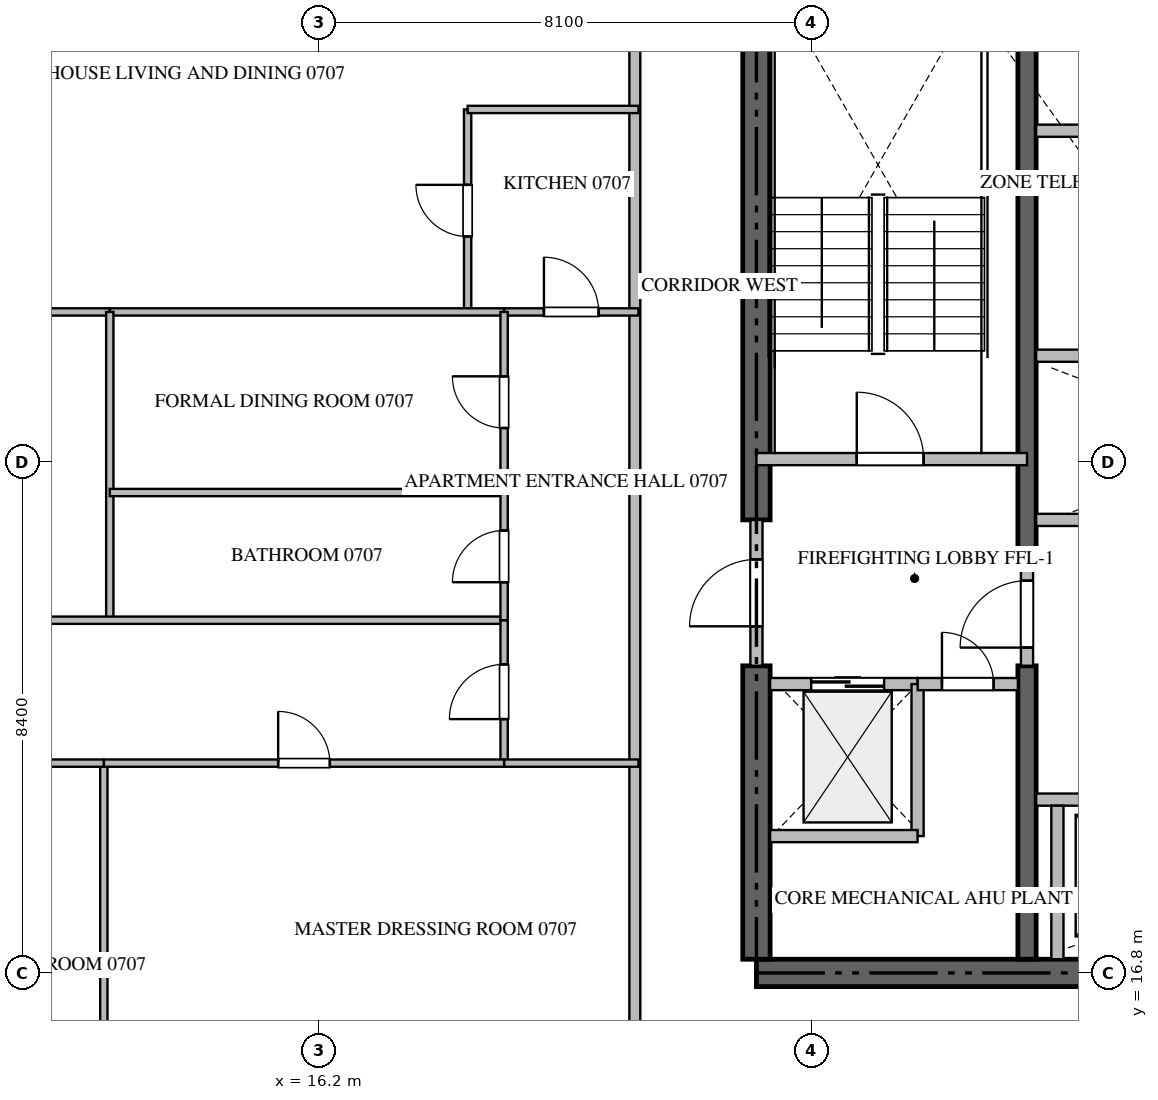
"""IFC4 building model, lengths in metres.
Left out: names, types, materials, properties, quantities, classifications, styles, units other than length and angle.
Written with IfcOpenShell. Run it as: python <this file> out.ifc"""

import sys

from ifc_helpers import new_model, si_unit, direction, frame, frame_2d, origin, place, context, subcontext, project, spatial, rectangle, extrude, source, transform, mapped, element, fill, save


model = new_model("IFC4")
c1 = context("Model", 3, precision=1e-05, world=origin(), true_north=direction((0.0, 1.0)))
c2 = subcontext(c1, "Body", "Model", "MODEL_VIEW")
j1 = project(units=[si_unit("LENGTHUNIT", "METRE"), si_unit("PLANEANGLEUNIT", "RADIAN")], contexts=[c1])
p1 = place(None, origin())
s1 = spatial("IfcSite", under=j1, at=p1, CompositionType="ELEMENT")
p2 = place(p1, origin())
s2 = spatial("IfcBuilding", under=s1, at=p2, CompositionType="ELEMENT")
p3 = place(p2, frame((0.0, 0.0, 34.2)))
s3 = spatial("IfcBuildingStorey", under=s2, at=p3, CompositionType="ELEMENT", Elevation=34.2)
p4 = place(p3, frame((23.4, 16.8, -0.26), z_axis=(0.0, 0.0, 1.0), x_axis=(1.0, 0.0, 0.0)))
e1 = element("IfcWall", 1, at=p4, inside=s3, PredefinedType="SHEAR", context=c2, shape_type="SweptSolid", body=[
    extrude(rectangle(XDim=18.0, YDim=0.45, at=frame_2d((9.0, 0.0))), origin(), (0.0, 0.0, 1.0), 3.748),
])
p5 = place(p3, frame((23.4, 17.025, -0.26), z_axis=(0.0, 0.0, 1.0), x_axis=(0.0, 1.0, 0.0)))
e2 = element("IfcWall", 2, at=p5, inside=s3, PredefinedType="SHEAR", context=c2, shape_type="SweptSolid", body=[
    extrude(rectangle(XDim=4.825, YDim=0.45, at=frame_2d((2.413, 0.0))), origin(), (0.0, 0.0, 1.0), 3.748),
])
p6 = place(p3, frame((23.4, 24.25, -0.26), z_axis=(0.0, 0.0, 1.0), x_axis=(0.0, 1.0, 0.0)))
e3 = element("IfcWall", 3, at=p6, inside=s3, PredefinedType="SHEAR", context=c2, shape_type="SweptSolid", body=[
    extrude(rectangle(XDim=9.125, YDim=0.45, at=frame_2d((4.562, 0.0))), origin(), (0.0, 0.0, 1.0), 3.748),
])
p7 = place(p3, frame((27.85, 17.025, -0.26), z_axis=(0.0, 0.0, 1.0), x_axis=(0.0, 1.0, 0.0)))
e4 = element("IfcWall", 4, at=p7, inside=s3, PredefinedType="SHEAR", context=c2, shape_type="SweptSolid", body=[
    extrude(rectangle(XDim=4.825, YDim=0.3, at=frame_2d((2.413, 0.0))), origin(), (0.0, 0.0, 1.0), 3.748),
])
p8 = place(p3, frame((27.85, 23.55, -0.26), z_axis=(0.0, 0.0, 1.0), x_axis=(0.0, 1.0, 0.0)))
e5 = element("IfcWall", 5, at=p8, inside=s3, PredefinedType="SHEAR", context=c2, shape_type="SweptSolid", body=[
    extrude(rectangle(XDim=9.825, YDim=0.3, at=frame_2d((4.913, 0.0))), origin(), (0.0, 0.0, 1.0), 3.748),
])
p9 = place(p3, frame((23.4, 25.25, 0.0), z_axis=(0.0, 0.0, 1.0), x_axis=(1.0, 0.0, 0.0)))
e6 = element("IfcWall", 6, at=p9, inside=s3, PredefinedType="STANDARD", context=c2, shape_type="SweptSolid", body=[
    extrude(rectangle(XDim=4.45, YDim=0.2, at=frame_2d((2.225, 0.0))), origin(), (0.0, 0.0, 1.0), 3.49),
])
p10 = place(p9, frame((1.65, 0.0, 0.0)))
e7 = element("IfcOpeningElement", 7, at=p10, cuts=e6, PredefinedType="OPENING", context=c2, shape_type="SweptSolid", body=[
    extrude(rectangle(XDim=1.1, YDim=2.15, at=frame_2d((0.55, 1.075))), frame((0.0, 0.11, 0.0), z_axis=(0.0, -1.0, 0.0), x_axis=(1.0, 0.0, 0.0)), (0.0, 0.0, 1.0), 0.22),
])
p11 = place(p3, frame((23.625, 21.55, 0.0), z_axis=(0.0, 0.0, 1.0), x_axis=(1.0, 0.0, 0.0)))
e8 = element("IfcWall", 8, at=p11, inside=s3, PredefinedType="STANDARD", context=c2, shape_type="SweptSolid", body=[
    extrude(rectangle(XDim=2.425, YDim=0.2, at=frame_2d((1.212, 0.0))), origin(), (0.0, 0.0, 1.0), 3.49),
])
p12 = place(p11, frame((0.675, 0.0, 0.0)))
e9 = element("IfcOpeningElement", 9, at=p12, cuts=e8, PredefinedType="OPENING", context=c2, shape_type="SweptSolid", body=[
    extrude(rectangle(XDim=1.2, YDim=2.2, at=frame_2d((0.6, 1.1))), frame((0.0, 0.11, 0.0), z_axis=(0.0, -1.0, 0.0), x_axis=(1.0, 0.0, 0.0)), (0.0, 0.0, 1.0), 0.22),
])
p13 = place(p3, frame((28.0, 19.65, 0.0), z_axis=(0.0, 0.0, 1.0), x_axis=(1.0, 0.0, 0.0)))
e10 = element("IfcWall", 10, at=p13, inside=s3, PredefinedType="STANDARD", context=c2, shape_type="SweptSolid", body=[
    extrude(rectangle(XDim=2.65, YDim=0.2, at=frame_2d((1.325, 0.0))), origin(), (0.0, 0.0, 1.0), 3.49),
])
p14 = place(p13, frame((0.9, 0.0, 0.0)))
e11 = element("IfcOpeningElement", 11, at=p14, cuts=e10, PredefinedType="OPENING", context=c2, shape_type="SweptSolid", body=[
    extrude(rectangle(XDim=1.1, YDim=2.2, at=frame_2d((0.55, 1.1))), frame((0.0, 0.11, 0.0), z_axis=(0.0, -1.0, 0.0), x_axis=(1.0, 0.0, 0.0)), (0.0, 0.0, 1.0), 0.22),
])
p15 = place(p3, frame((28.35, 17.025, 0.0), z_axis=(0.0, 0.0, 1.0), x_axis=(0.0, 1.0, 0.0)))
e12 = element("IfcWall", 12, at=p15, inside=s3, PredefinedType="STANDARD", context=c2, shape_type="SweptSolid", body=[
    extrude(rectangle(XDim=2.525, YDim=0.2, at=frame_2d((1.263, 0.0))), origin(), (0.0, 0.0, 1.0), 3.49),
])
p16 = place(p3, frame((28.0, 24.25, 0.0), z_axis=(0.0, 0.0, 1.0), x_axis=(1.0, 0.0, 0.0)))
e13 = element("IfcWall", 13, at=p16, inside=s3, PredefinedType="STANDARD", context=c2, shape_type="SweptSolid", body=[
    extrude(rectangle(XDim=2.425, YDim=0.2, at=frame_2d((1.212, 0.0))), origin(), (0.0, 0.0, 1.0), 3.49),
])
p17 = place(p3, frame((28.0, 30.65, 0.0), z_axis=(0.0, 0.0, 1.0), x_axis=(1.0, 0.0, 0.0)))
e14 = element("IfcWall", 14, at=p17, inside=s3, PredefinedType="STANDARD", context=c2, shape_type="SweptSolid", body=[
    extrude(rectangle(XDim=2.55, YDim=0.2, at=frame_2d((1.275, 0.0))), origin(), (0.0, 0.0, 1.0), 3.49),
])
p18 = place(p3, frame((26.05, 19.05, 0.0), z_axis=(0.0, 0.0, 1.0), x_axis=(0.0, 1.0, 0.0)))
e15 = element("IfcWall", 15, at=p18, inside=s3, PredefinedType="STANDARD", context=c2, shape_type="SweptSolid", body=[
    extrude(rectangle(XDim=2.5, YDim=0.2, at=frame_2d((1.25, 0.0))), origin(), (0.0, 0.0, 1.0), 3.49),
])
p19 = place(p3, frame((23.625, 19.05, 0.0), z_axis=(0.0, 0.0, 1.0), x_axis=(1.0, 0.0, 0.0)))
e16 = element("IfcWall", 16, at=p19, inside=s3, PredefinedType="STANDARD", context=c2, shape_type="SweptSolid", body=[
    extrude(rectangle(XDim=2.425, YDim=0.2, at=frame_2d((1.212, 0.0))), origin(), (0.0, 0.0, 1.0), 3.49),
])
p20 = place(p3, frame((26.052, 21.55, 0.0), z_axis=(0.0, 0.0, 1.0), x_axis=(1.0, 0.0, 0.0)))
e17 = element("IfcWall", 17, at=p20, inside=s3, PredefinedType="STANDARD", context=c2, shape_type="SweptSolid", body=[
    extrude(rectangle(XDim=1.648, YDim=0.2, at=frame_2d((0.824, 0.0))), origin(), (0.0, 0.0, 1.0), 3.49),
])
p21 = place(p20, frame((0.399, 0.0, 0.0)))
e18 = element("IfcOpeningElement", 18, at=p21, cuts=e17, PredefinedType="OPENING", context=c2, shape_type="SweptSolid", body=[
    extrude(rectangle(XDim=0.85, YDim=2.1, at=frame_2d((0.425, 1.05))), frame((0.0, 0.11, 0.0), z_axis=(0.0, -1.0, 0.0), x_axis=(1.0, 0.0, 0.0)), (0.0, 0.0, 1.0), 0.22),
])
p22 = place(p3, frame((23.4, 21.852, 0.0), z_axis=(0.0, 0.0, 1.0), x_axis=(0.0, 1.0, 0.0)))
e19 = element("IfcWall", 19, at=p22, inside=s3, PredefinedType="STANDARD", context=c2, shape_type="SweptSolid", body=[
    extrude(rectangle(XDim=2.396, YDim=0.2, at=frame_2d((1.198, 0.0))), origin(), (0.0, 0.0, 1.0), 3.49),
])
p23 = place(p22, frame((0.648, 0.0, 0.0)))
e20 = element("IfcOpeningElement", 20, at=p23, cuts=e19, PredefinedType="OPENING", context=c2, shape_type="SweptSolid", body=[
    extrude(rectangle(XDim=1.1, YDim=2.15, at=frame_2d((0.55, 1.075))), frame((0.0, 0.11, 0.0), z_axis=(0.0, -1.0, 0.0), x_axis=(1.0, 0.0, 0.0)), (0.0, 0.0, 1.0), 0.22),
])
p24 = place(p3, frame((27.85, 21.852, 0.0), z_axis=(0.0, 0.0, 1.0), x_axis=(0.0, 1.0, 0.0)))
e21 = element("IfcWall", 21, at=p24, inside=s3, PredefinedType="STANDARD", context=c2, shape_type="SweptSolid", body=[
    extrude(rectangle(XDim=1.696, YDim=0.2, at=frame_2d((0.848, 0.0))), origin(), (0.0, 0.0, 1.0), 3.49),
])
p25 = place(p24, frame((0.298, 0.0, 0.0)))
e22 = element("IfcOpeningElement", 22, at=p25, cuts=e21, PredefinedType="OPENING", context=c2, shape_type="SweptSolid", body=[
    extrude(rectangle(XDim=1.1, YDim=2.15, at=frame_2d((0.55, 1.075))), frame((0.0, 0.11, 0.0), z_axis=(0.0, -1.0, 0.0), x_axis=(1.0, 0.0, 0.0)), (0.0, 0.0, 1.0), 0.22),
])
p26 = place(p3, frame((28.0, 26.95, 0.0), z_axis=(0.0, 0.0, 1.0), x_axis=(1.0, 0.0, 0.0)))
e23 = element("IfcWall", 23, at=p26, inside=s3, PredefinedType="STANDARD", context=c2, shape_type="SweptSolid", body=[
    extrude(rectangle(XDim=6.95, YDim=0.2, at=frame_2d((3.475, 0.0))), origin(), (0.0, 0.0, 1.0), 3.49),
])
p27 = place(p3, frame((21.4, 14.9, 0.0), z_axis=(0.0, 0.0, 1.0), x_axis=(0.0, 1.0, 0.0)))
e24 = element("IfcWall", 24, at=p27, inside=s3, PredefinedType="PARTITIONING", context=c2, shape_type="SweptSolid", body=[
    extrude(rectangle(XDim=20.6, YDim=0.18, at=frame_2d((10.3, 0.0))), origin(), (0.0, 0.0, 1.0), 3.49),
])
p28 = place(p27, frame((17.64, 0.0, 0.0)))
e25 = element("IfcOpeningElement", 25, at=p28, cuts=e24, PredefinedType="OPENING", context=c2, shape_type="SweptSolid", body=[
    extrude(rectangle(XDim=1.0, YDim=2.15, at=frame_2d((0.5, 1.075))), frame((0.0, 0.1, 0.0), z_axis=(0.0, -1.0, 0.0), x_axis=(1.0, 0.0, 0.0)), (0.0, 0.0, 1.0), 0.2),
])
p29 = place(p3, frame((18.65, 27.67, 0.0), z_axis=(0.0, 0.0, 1.0), x_axis=(0.0, 1.0, 0.0)))
e26 = element("IfcWall", 26, at=p29, inside=s3, PredefinedType="PARTITIONING", context=c2, shape_type="SweptSolid", body=[
    extrude(rectangle(XDim=3.33, YDim=0.12, at=frame_2d((1.665, 0.0))), origin(), (0.0, 0.0, 1.0), 3.49),
])
p30 = place(p29, frame((1.24, 0.0, 0.0)))
e27 = element("IfcOpeningElement", 27, at=p30, cuts=e26, PredefinedType="OPENING", context=c2, shape_type="SweptSolid", body=[
    extrude(rectangle(XDim=0.85, YDim=2.1, at=frame_2d((0.425, 1.05))), frame((0.0, 0.07, 0.0), z_axis=(0.0, -1.0, 0.0), x_axis=(1.0, 0.0, 0.0)), (0.0, 0.0, 1.0), 0.14),
])
p31 = place(p3, frame((18.65, 31.0, 0.0), z_axis=(0.0, 0.0, 1.0), x_axis=(1.0, 0.0, 0.0)))
e28 = element("IfcWall", 28, at=p31, inside=s3, PredefinedType="PARTITIONING", context=c2, shape_type="SweptSolid", body=[
    extrude(rectangle(XDim=2.81, YDim=0.12, at=frame_2d((1.405, 0.0))), origin(), (0.0, 0.0, 1.0), 3.49),
])
p32 = place(p3, frame((19.25, 27.67, 0.0), z_axis=(0.0, 0.0, 1.0), x_axis=(1.0, 0.0, 0.0)))
e29 = element("IfcWall", 29, at=p32, inside=s3, PredefinedType="PARTITIONING", context=c2, shape_type="SweptSolid", body=[
    extrude(rectangle(XDim=2.21, YDim=0.12, at=frame_2d((1.105, 0.0))), origin(), (0.0, 0.0, 1.0), 3.49),
])
p33 = place(p32, frame((0.655, 0.0, 0.0)))
e30 = element("IfcOpeningElement", 30, at=p33, cuts=e29, PredefinedType="OPENING", context=c2, shape_type="SweptSolid", body=[
    extrude(rectangle(XDim=0.9, YDim=2.1, at=frame_2d((0.45, 1.05))), frame((0.0, 0.07, 0.0), z_axis=(0.0, -1.0, 0.0), x_axis=(1.0, 0.0, 0.0)), (0.0, 0.0, 1.0), 0.14),
])
p34 = place(p3, frame((6.095, 27.67, 0.0), z_axis=(0.0, 0.0, 1.0), x_axis=(1.0, 0.0, 0.0)))
e31 = element("IfcWall", 31, at=p34, inside=s3, PredefinedType="PARTITIONING", context=c2, shape_type="SweptSolid", body=[
    extrude(rectangle(XDim=6.67, YDim=0.12, at=frame_2d((3.335, 0.0))), origin(), (0.0, 0.0, 1.0), 3.49),
])
p35 = place(p34, frame((3.174, 0.0, 0.0)))
e32 = element("IfcOpeningElement", 32, at=p35, cuts=e31, PredefinedType="OPENING", context=c2, shape_type="SweptSolid", body=[
    extrude(rectangle(XDim=0.9, YDim=2.1, at=frame_2d((0.45, 1.05))), frame((0.0, 0.07, 0.0), z_axis=(0.0, -1.0, 0.0), x_axis=(1.0, 0.0, 0.0)), (0.0, 0.0, 1.0), 0.14),
])
p36 = place(p3, frame((12.767, 27.67, 0.0), z_axis=(0.0, 0.0, 1.0), x_axis=(1.0, 0.0, 0.0)))
e33 = element("IfcWall", 33, at=p36, inside=s3, PredefinedType="PARTITIONING", context=c2, shape_type="SweptSolid", body=[
    extrude(rectangle(XDim=6.481, YDim=0.12, at=frame_2d((3.24, 0.0))), origin(), (0.0, 0.0, 1.0), 3.49),
])
p37 = place(p3, frame((12.765, 22.6, 0.0), z_axis=(0.0, 0.0, 1.0), x_axis=(0.0, 1.0, 0.0)))
e34 = element("IfcWall", 34, at=p37, inside=s3, PredefinedType="PARTITIONING", context=c2, shape_type="SweptSolid", body=[
    extrude(rectangle(XDim=5.07, YDim=0.12, at=frame_2d((2.535, 0.0))), origin(), (0.0, 0.0, 1.0), 3.49),
])
p38 = place(p3, frame((6.095, 22.6, 0.0), z_axis=(0.0, 0.0, 1.0), x_axis=(1.0, 0.0, 0.0)))
e35 = element("IfcWall", 35, at=p38, inside=s3, PredefinedType="PARTITIONING", context=c2, shape_type="SweptSolid", body=[
    extrude(rectangle(XDim=13.155, YDim=0.12, at=frame_2d((6.578, 0.0))), origin(), (0.0, 0.0, 1.0), 3.49),
])
p39 = place(p3, frame((12.765, 24.7, 0.0), z_axis=(0.0, 0.0, 1.0), x_axis=(1.0, 0.0, 0.0)))
e36 = element("IfcWall", 36, at=p39, inside=s3, PredefinedType="PARTITIONING", context=c2, shape_type="SweptSolid", body=[
    extrude(rectangle(XDim=6.485, YDim=0.12, at=frame_2d((3.243, 0.0))), origin(), (0.0, 0.0, 1.0), 3.49),
])
p40 = place(p3, frame((19.25, 22.6, 0.0), z_axis=(0.0, 0.0, 1.0), x_axis=(0.0, 1.0, 0.0)))
e37 = element("IfcWall", 37, at=p40, inside=s3, PredefinedType="PARTITIONING", context=c2, shape_type="SweptSolid", body=[
    extrude(rectangle(XDim=2.1, YDim=0.12, at=frame_2d((1.05, 0.0))), origin(), (0.0, 0.0, 1.0), 3.49),
])
p41 = place(p40, frame((0.625, 0.0, 0.0)))
e38 = element("IfcOpeningElement", 38, at=p41, cuts=e37, PredefinedType="OPENING", context=c2, shape_type="SweptSolid", body=[
    extrude(rectangle(XDim=0.85, YDim=2.1, at=frame_2d((0.425, 1.05))), frame((0.0, 0.07, 0.0), z_axis=(0.0, -1.0, 0.0), x_axis=(1.0, 0.0, 0.0)), (0.0, 0.0, 1.0), 0.14),
])
p42 = place(p3, frame((19.25, 24.702, 0.0), z_axis=(0.0, 0.0, 1.0), x_axis=(0.0, 1.0, 0.0)))
e39 = element("IfcWall", 39, at=p42, inside=s3, PredefinedType="PARTITIONING", context=c2, shape_type="SweptSolid", body=[
    extrude(rectangle(XDim=2.968, YDim=0.12, at=frame_2d((1.484, 0.0))), origin(), (0.0, 0.0, 1.0), 3.49),
])
p43 = place(p42, frame((1.059, 0.0, 0.0)))
e40 = element("IfcOpeningElement", 40, at=p43, cuts=e39, PredefinedType="OPENING", context=c2, shape_type="SweptSolid", body=[
    extrude(rectangle(XDim=0.85, YDim=2.1, at=frame_2d((0.425, 1.05))), frame((0.0, 0.07, 0.0), z_axis=(0.0, -1.0, 0.0), x_axis=(1.0, 0.0, 0.0)), (0.0, 0.0, 1.0), 0.14),
])
p44 = place(p3, frame((19.25, 20.25, 0.0), z_axis=(0.0, 0.0, 1.0), x_axis=(0.0, 1.0, 0.0)))
e41 = element("IfcWall", 41, at=p44, inside=s3, PredefinedType="PARTITIONING", context=c2, shape_type="SweptSolid", body=[
    extrude(rectangle(XDim=2.348, YDim=0.12, at=frame_2d((1.174, 0.0))), origin(), (0.0, 0.0, 1.0), 3.49),
])
p45 = place(p44, frame((0.724, 0.0, 0.0)))
e42 = element("IfcOpeningElement", 42, at=p45, cuts=e41, PredefinedType="OPENING", context=c2, shape_type="SweptSolid", body=[
    extrude(rectangle(XDim=0.9, YDim=2.1, at=frame_2d((0.45, 1.05))), frame((0.0, 0.07, 0.0), z_axis=(0.0, -1.0, 0.0), x_axis=(1.0, 0.0, 0.0)), (0.0, 0.0, 1.0), 0.14),
])
p46 = place(p3, frame((12.667, 14.84, 0.0), z_axis=(0.0, 0.0, 1.0), x_axis=(0.0, 1.0, 0.0)))
e43 = element("IfcWall", 43, at=p46, inside=s3, PredefinedType="PARTITIONING", context=c2, shape_type="SweptSolid", body=[
    extrude(rectangle(XDim=5.41, YDim=0.12, at=frame_2d((2.705, 0.0))), origin(), (0.0, 0.0, 1.0), 3.49),
])
p47 = place(p3, frame((10.05, 20.25, 0.0), z_axis=(0.0, 0.0, 1.0), x_axis=(1.0, 0.0, 0.0)))
e44 = element("IfcWall", 44, at=p47, inside=s3, PredefinedType="PARTITIONING", context=c2, shape_type="SweptSolid", body=[
    extrude(rectangle(XDim=2.617, YDim=0.12, at=frame_2d((1.309, 0.0))), origin(), (0.0, 0.0, 1.0), 3.49),
])
p48 = place(p47, frame((0.883, 0.0, 0.0)))
e45 = element("IfcOpeningElement", 45, at=p48, cuts=e44, PredefinedType="OPENING", context=c2, shape_type="SweptSolid", body=[
    extrude(rectangle(XDim=0.85, YDim=2.1, at=frame_2d((0.425, 1.05))), frame((0.0, 0.07, 0.0), z_axis=(0.0, -1.0, 0.0), x_axis=(1.0, 0.0, 0.0)), (0.0, 0.0, 1.0), 0.14),
])
p49 = place(p3, frame((12.669, 20.25, 0.0), z_axis=(0.0, 0.0, 1.0), x_axis=(1.0, 0.0, 0.0)))
e46 = element("IfcWall", 46, at=p49, inside=s3, PredefinedType="PARTITIONING", context=c2, shape_type="SweptSolid", body=[
    extrude(rectangle(XDim=6.581, YDim=0.12, at=frame_2d((3.291, 0.0))), origin(), (0.0, 0.0, 1.0), 3.49),
])
p50 = place(p49, frame((2.865, 0.0, 0.0)))
e47 = element("IfcOpeningElement", 47, at=p50, cuts=e46, PredefinedType="OPENING", context=c2, shape_type="SweptSolid", body=[
    extrude(rectangle(XDim=0.85, YDim=2.1, at=frame_2d((0.425, 1.05))), frame((0.0, 0.07, 0.0), z_axis=(0.0, -1.0, 0.0), x_axis=(1.0, 0.0, 0.0)), (0.0, 0.0, 1.0), 0.14),
])
p51 = place(p3, frame((19.252, 20.25, 0.0), z_axis=(0.0, 0.0, 1.0), x_axis=(1.0, 0.0, 0.0)))
e48 = element("IfcWall", 48, at=p51, inside=s3, PredefinedType="PARTITIONING", context=c2, shape_type="SweptSolid", body=[
    extrude(rectangle(XDim=2.208, YDim=0.12, at=frame_2d((1.104, 0.0))), origin(), (0.0, 0.0, 1.0), 3.49),
])
m1 = source(origin(), c2, "Body", "SweptSolid", [
    extrude(rectangle(XDim=1.1, YDim=2.15, at=frame_2d((0.55, 1.075))), frame((0.0, 0.025, 0.0), z_axis=(0.0, -1.0, 0.0), x_axis=(1.0, 0.0, 0.0)), (0.0, 0.0, 1.0), 0.05),
])
p52 = place(p10, origin())
e49 = element("IfcDoor", 49, at=p52, inside=s3, OperationType="SINGLE_SWING_LEFT", PredefinedType="DOOR", context=c2, shape_type="MappedRepresentation", body=[
    mapped(m1, transform((0.0, 0.0, 0.0), scale=1.0)),
])
fill(e7, e49)
m2 = source(origin(), c2, "Body", "SweptSolid", [
    extrude(rectangle(XDim=1.2, YDim=2.2, at=frame_2d((0.6, 1.1))), frame((0.0, 0.025, 0.0), z_axis=(0.0, -1.0, 0.0), x_axis=(1.0, 0.0, 0.0)), (0.0, 0.0, 1.0), 0.05),
])
p53 = place(p12, origin())
e50 = element("IfcDoor", 50, at=p53, inside=s3, OperationType="DOUBLE_DOOR_SLIDING", PredefinedType="DOOR", context=c2, shape_type="MappedRepresentation", body=[
    mapped(m2, transform((0.0, 0.0, 0.0), scale=1.0)),
])
fill(e9, e50)
m3 = source(origin(), c2, "Body", "SweptSolid", [
    extrude(rectangle(XDim=0.85, YDim=2.1, at=frame_2d((0.425, 1.05))), frame((0.0, 0.025, 0.0), z_axis=(0.0, -1.0, 0.0), x_axis=(1.0, 0.0, 0.0)), (0.0, 0.0, 1.0), 0.05),
])
p54 = place(p21, origin())
e51 = element("IfcDoor", 51, at=p54, inside=s3, OperationType="SINGLE_SWING_LEFT", PredefinedType="DOOR", context=c2, shape_type="MappedRepresentation", body=[
    mapped(m3, transform((0.0, 0.0, 0.0), scale=1.0)),
])
fill(e18, e51)
p55 = place(p23, origin())
e52 = element("IfcDoor", 52, at=p55, inside=s3, OperationType="SINGLE_SWING_LEFT", PredefinedType="DOOR", context=c2, shape_type="MappedRepresentation", body=[
    mapped(m1, transform((0.0, 0.0, 0.0), scale=1.0)),
])
fill(e20, e52)
p56 = place(p25, origin())
e53 = element("IfcDoor", 53, at=p56, inside=s3, OperationType="SINGLE_SWING_LEFT", PredefinedType="DOOR", context=c2, shape_type="MappedRepresentation", body=[
    mapped(m1, transform((0.0, 0.0, 0.0), scale=1.0)),
])
fill(e22, e53)
p57 = place(p30, origin())
e54 = element("IfcDoor", 54, at=p57, inside=s3, OperationType="SINGLE_SWING_RIGHT", PredefinedType="DOOR", context=c2, shape_type="MappedRepresentation", body=[
    mapped(m3, transform((0.0, 0.0, 0.0), scale=1.0)),
])
fill(e27, e54)
m4 = source(origin(), c2, "Body", "SweptSolid", [
    extrude(rectangle(XDim=0.9, YDim=2.1, at=frame_2d((0.45, 1.05))), frame((0.0, 0.025, 0.0), z_axis=(0.0, -1.0, 0.0), x_axis=(1.0, 0.0, 0.0)), (0.0, 0.0, 1.0), 0.05),
])
p58 = place(p33, origin())
e55 = element("IfcDoor", 55, at=p58, inside=s3, OperationType="SINGLE_SWING_LEFT", PredefinedType="DOOR", context=c2, shape_type="MappedRepresentation", body=[
    mapped(m4, transform((0.0, 0.0, 0.0), scale=1.0)),
])
fill(e30, e55)
p59 = place(p41, origin())
e56 = element("IfcDoor", 56, at=p59, inside=s3, OperationType="SINGLE_SWING_LEFT", PredefinedType="DOOR", context=c2, shape_type="MappedRepresentation", body=[
    mapped(m3, transform((0.0, 0.0, 0.0), scale=1.0)),
])
fill(e38, e56)
p60 = place(p43, origin())
e57 = element("IfcDoor", 57, at=p60, inside=s3, OperationType="SINGLE_SWING_RIGHT", PredefinedType="DOOR", context=c2, shape_type="MappedRepresentation", body=[
    mapped(m3, transform((0.0, 0.0, 0.0), scale=1.0)),
])
fill(e40, e57)
p61 = place(p45, origin())
e58 = element("IfcDoor", 58, at=p61, inside=s3, OperationType="SINGLE_SWING_LEFT", PredefinedType="DOOR", context=c2, shape_type="MappedRepresentation", body=[
    mapped(m4, transform((0.0, 0.0, 0.0), scale=1.0)),
])
fill(e42, e58)
p62 = place(p50, origin())
e59 = element("IfcDoor", 59, at=p62, inside=s3, OperationType="SINGLE_SWING_LEFT", PredefinedType="DOOR", context=c2, shape_type="MappedRepresentation", body=[
    mapped(m3, transform((0.0, 0.0, 0.0), scale=1.0)),
])
fill(e47, e59)
save(model, sys.argv[1])
